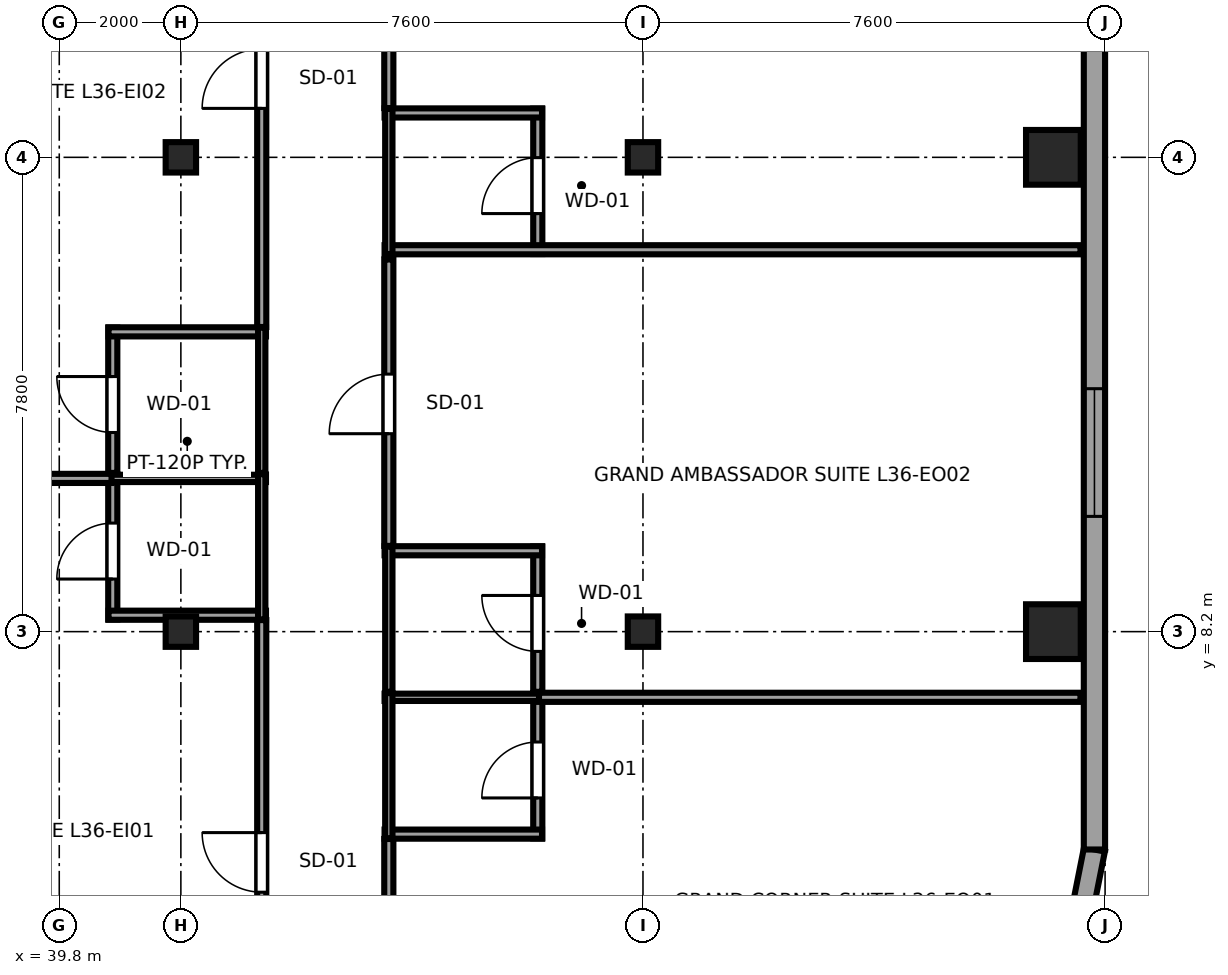
"""IFC4 building model, lengths in metres.
Left out: names, types, materials, properties, quantities, classifications, styles, units other than length and angle.
Written with IfcOpenShell. Run it as: python <this file> out.ifc"""

import sys

from ifc_helpers import new_model, si_unit, direction, frame, frame_2d, origin, origin_2d, place, context, subcontext, project, spatial, rectangle, i_section, extrude, source, transform, mapped, element, fill, save


model = new_model("IFC4")
c1 = context("Model", 3, precision=1e-05, world=origin(), true_north=direction((0.0, 1.0)))
c2 = subcontext(c1, "Body", "Model", "MODEL_VIEW")
j1 = project(units=[si_unit("LENGTHUNIT", "METRE"), si_unit("PLANEANGLEUNIT", "RADIAN")], contexts=[c1])
p1 = place(None, origin())
s1 = spatial("IfcSite", under=j1, at=p1, CompositionType="ELEMENT")
p2 = place(p1, origin())
s2 = spatial("IfcBuilding", under=s1, at=p2, CompositionType="ELEMENT")
p3 = place(p2, frame((0.0, 0.0, 139.95)))
s3 = spatial("IfcBuildingStorey", under=s2, at=p3, CompositionType="ELEMENT", Elevation=139.95)
m1 = source(origin(), c2, "Body", "SweptSolid", [
    extrude(i_section(OverallWidth=0.5, OverallDepth=0.5, WebThickness=0.022, FlangeThickness=0.034, at=origin_2d()), origin(), (0.0, 0.0, 1.0), 3.55),
])
for number, where, z_axis, x_axis in (
    (1, (41.8, 8.2, 0.0), (0.0, 0.0, 1.0), (1.0, 0.0, 0.0)),
    (2, (41.8, 16.0, 0.0), (0.0, 0.0, 1.0), (1.0, 0.0, 0.0)),
    (3, (49.4, 8.2, 0.0), (0.0, 0.0, 1.0), (1.0, 0.0, 0.0)),
    (4, (49.4, 16.0, 0.0), (0.0, 0.0, 1.0), (1.0, 0.0, 0.0)),
):
    element("IfcColumn", number, at=place(p3, frame(where, z_axis=z_axis, x_axis=x_axis)), inside=s3, PredefinedType="COLUMN", context=c2, shape_type="MappedRepresentation", body=[
        mapped(m1, transform((0.0, 0.0, 0.0), x_axis=(1.0, 0.0, 0.0), y_axis=(0.0, 1.0, 0.0), z_axis=(0.0, 0.0, 1.0), scale=1.0)),
    ])
m2 = source(origin(), c2, "Body", "SweptSolid", [
    extrude(rectangle(XDim=0.9, YDim=0.9, at=origin_2d()), origin(), (0.0, 0.0, 1.0), 3.55),
])
for number, where, z_axis, x_axis in (
    (5, (56.15, 8.2, 0.0), (0.0, 0.0, 1.0), (1.0, 0.0, 0.0)),
    (6, (56.15, 16.0, 0.0), (0.0, 0.0, 1.0), (1.0, 0.0, 0.0)),
):
    element("IfcColumn", number, at=place(p3, frame(where, z_axis=z_axis, x_axis=x_axis)), inside=s3, PredefinedType="COLUMN", context=c2, shape_type="MappedRepresentation", body=[
        mapped(m2, transform((0.0, 0.0, 0.0), x_axis=(1.0, 0.0, 0.0), y_axis=(0.0, 1.0, 0.0), z_axis=(0.0, 0.0, 1.0), scale=1.0)),
    ])
p4 = place(p3, frame((56.485, 2.908, 0.0), z_axis=(0.0, 0.0, 1.0), x_axis=(0.195011420161, 0.980800971659, 0.0)))
e7 = element("IfcWall", 7, at=p4, inside=s3, PredefinedType="SOLIDWALL", context=c2, shape_type="SweptSolid", body=[
    extrude(rectangle(XDim=1.743, YDim=0.35, at=frame_2d((0.871, 0.0))), origin(), (0.0, 0.0, 1.0), 3.37),
])
p5 = place(p3, frame((56.825, 4.617, 0.0), z_axis=(0.0, 0.0, 1.0), x_axis=(0.0, 1.0, 0.0)))
e8 = element("IfcWall", 8, at=p5, inside=s3, PredefinedType="SOLIDWALL", context=c2, shape_type="SweptSolid", body=[
    extrude(rectangle(XDim=36.766, YDim=0.35, at=frame_2d((18.383, 0.0))), origin(), (0.0, 0.0, 1.0), 3.37),
])
p6 = place(p5, frame((5.478, 0.0, 0.68)))
e9 = element("IfcOpeningElement", 9, at=p6, cuts=e8, PredefinedType="OPENING", context=c2, shape_type="SweptSolid", body=[
    extrude(rectangle(XDim=2.1, YDim=1.9, at=frame_2d((1.05, 0.95))), frame((0.0, 0.185, 0.0), z_axis=(0.0, -1.0, 0.0), x_axis=(1.0, 0.0, 0.0)), (0.0, 0.0, 1.0), 0.37),
])
p7 = place(p5, frame((13.381, 0.0, 0.68)))
e10 = element("IfcOpeningElement", 10, at=p7, cuts=e8, PredefinedType="OPENING", context=c2, shape_type="SweptSolid", body=[
    extrude(rectangle(XDim=2.1, YDim=1.9, at=frame_2d((1.05, 0.95))), frame((0.0, 0.185, 0.0), z_axis=(0.0, -1.0, 0.0), x_axis=(1.0, 0.0, 0.0)), (0.0, 0.0, 1.0), 0.37),
])
p8 = place(p5, frame((21.285, 0.0, 0.68)))
e11 = element("IfcOpeningElement", 11, at=p8, cuts=e8, PredefinedType="OPENING", context=c2, shape_type="SweptSolid", body=[
    extrude(rectangle(XDim=2.1, YDim=1.9, at=frame_2d((1.05, 0.95))), frame((0.0, 0.185, 0.0), z_axis=(0.0, -1.0, 0.0), x_axis=(1.0, 0.0, 0.0)), (0.0, 0.0, 1.0), 0.37),
])
p9 = place(p5, frame((30.238, 0.0, 0.68)))
e12 = element("IfcOpeningElement", 12, at=p9, cuts=e8, PredefinedType="OPENING", context=c2, shape_type="SweptSolid", body=[
    extrude(rectangle(XDim=2.1, YDim=1.9, at=frame_2d((1.05, 0.95))), frame((0.0, 0.185, 0.0), z_axis=(0.0, -1.0, 0.0), x_axis=(1.0, 0.0, 0.0)), (0.0, 0.0, 1.0), 0.37),
])
p10 = place(p3, frame((40.68, 8.4, 0.0), z_axis=(0.0, 0.0, 1.0), x_axis=(0.0, 1.0, 0.0)))
e13 = element("IfcWall", 13, at=p10, inside=s3, PredefinedType="PARTITIONING", context=c2, shape_type="SweptSolid", body=[
    extrude(rectangle(XDim=2.39, YDim=0.15, at=frame_2d((1.195, 0.0))), origin(), (0.0, 0.0, 1.0), 3.37),
])
p11 = place(p10, frame((0.665, 0.0, 0.0)))
e14 = element("IfcOpeningElement", 14, at=p11, cuts=e13, PredefinedType="OPENING", context=c2, shape_type="SweptSolid", body=[
    extrude(rectangle(XDim=0.92, YDim=2.01, at=frame_2d((0.46, 1.005))), frame((0.0, 0.085, 0.0), z_axis=(0.0, -1.0, 0.0), x_axis=(1.0, 0.0, 0.0)), (0.0, 0.0, 1.0), 0.17),
])
p12 = place(p3, frame((40.61, 8.47, 0.0), z_axis=(0.0, 0.0, 1.0), x_axis=(1.0, 0.0, 0.0)))
e15 = element("IfcWall", 15, at=p12, inside=s3, PredefinedType="PARTITIONING", context=c2, shape_type="SweptSolid", body=[
    extrude(rectangle(XDim=2.59, YDim=0.15, at=frame_2d((1.295, 0.0))), origin(), (0.0, 0.0, 1.0), 3.37),
])
p13 = place(p3, frame((40.61, 10.72, 0.0), z_axis=(0.0, 0.0, 1.0), x_axis=(1.0, 0.0, 0.0)))
e16 = element("IfcWall", 16, at=p13, inside=s3, PredefinedType="PLUMBINGWALL", context=c2, shape_type="SweptSolid", body=[
    extrude(rectangle(XDim=2.59, YDim=0.12, at=frame_2d((1.295, 0.0))), origin(), (0.0, 0.0, 1.0), 3.37),
])
p14 = place(p3, frame((43.13, 8.4, 0.0), z_axis=(0.0, 0.0, 1.0), x_axis=(0.0, 1.0, 0.0)))
e17 = element("IfcWall", 17, at=p14, inside=s3, PredefinedType="PLUMBINGWALL", context=c2, shape_type="SweptSolid", body=[
    extrude(rectangle(XDim=2.39, YDim=0.12, at=frame_2d((1.195, 0.0))), origin(), (0.0, 0.0, 1.0), 3.37),
])
p15 = place(p3, frame((40.68, 10.81, 0.0), z_axis=(0.0, 0.0, 1.0), x_axis=(0.0, 1.0, 0.0)))
e18 = element("IfcWall", 18, at=p15, inside=s3, PredefinedType="PARTITIONING", context=c2, shape_type="SweptSolid", body=[
    extrude(rectangle(XDim=2.39, YDim=0.15, at=frame_2d((1.195, 0.0))), origin(), (0.0, 0.0, 1.0), 3.37),
])
p16 = place(p15, frame((0.665, 0.0, 0.0)))
e19 = element("IfcOpeningElement", 19, at=p16, cuts=e18, PredefinedType="OPENING", context=c2, shape_type="SweptSolid", body=[
    extrude(rectangle(XDim=0.92, YDim=2.01, at=frame_2d((0.46, 1.005))), frame((0.0, 0.085, 0.0), z_axis=(0.0, -1.0, 0.0), x_axis=(1.0, 0.0, 0.0)), (0.0, 0.0, 1.0), 0.17),
])
p17 = place(p3, frame((40.61, 13.13, 0.0), z_axis=(0.0, 0.0, 1.0), x_axis=(1.0, 0.0, 0.0)))
e20 = element("IfcWall", 20, at=p17, inside=s3, PredefinedType="PARTITIONING", context=c2, shape_type="SweptSolid", body=[
    extrude(rectangle(XDim=2.59, YDim=0.15, at=frame_2d((1.295, 0.0))), origin(), (0.0, 0.0, 1.0), 3.37),
])
p18 = place(p3, frame((43.13, 10.81, 0.0), z_axis=(0.0, 0.0, 1.0), x_axis=(0.0, 1.0, 0.0)))
e21 = element("IfcWall", 21, at=p18, inside=s3, PredefinedType="PLUMBINGWALL", context=c2, shape_type="SweptSolid", body=[
    extrude(rectangle(XDim=2.39, YDim=0.12, at=frame_2d((1.195, 0.0))), origin(), (0.0, 0.0, 1.0), 3.37),
])
p19 = place(p3, frame((47.67, 4.8, 0.0), z_axis=(0.0, 0.0, 1.0), x_axis=(0.0, 1.0, 0.0)))
e22 = element("IfcWall", 22, at=p19, inside=s3, PredefinedType="PARTITIONING", context=c2, shape_type="SweptSolid", body=[
    extrude(rectangle(XDim=2.39, YDim=0.15, at=frame_2d((1.195, 0.0))), origin(), (0.0, 0.0, 1.0), 3.37),
])
p20 = place(p19, frame((0.665, 0.0, 0.0)))
e23 = element("IfcOpeningElement", 23, at=p20, cuts=e22, PredefinedType="OPENING", context=c2, shape_type="SweptSolid", body=[
    extrude(rectangle(XDim=0.92, YDim=2.01, at=frame_2d((0.46, 1.005))), frame((0.0, 0.085, 0.0), z_axis=(0.0, -1.0, 0.0), x_axis=(1.0, 0.0, 0.0)), (0.0, 0.0, 1.0), 0.17),
])
p21 = place(p3, frame((45.15, 4.87, 0.0), z_axis=(0.0, 0.0, 1.0), x_axis=(1.0, 0.0, 0.0)))
e24 = element("IfcWall", 24, at=p21, inside=s3, PredefinedType="PARTITIONING", context=c2, shape_type="SweptSolid", body=[
    extrude(rectangle(XDim=2.59, YDim=0.15, at=frame_2d((1.295, 0.0))), origin(), (0.0, 0.0, 1.0), 3.37),
])
p22 = place(p3, frame((45.15, 7.12, 0.0), z_axis=(0.0, 0.0, 1.0), x_axis=(1.0, 0.0, 0.0)))
e25 = element("IfcWall", 25, at=p22, inside=s3, PredefinedType="PLUMBINGWALL", context=c2, shape_type="SweptSolid", body=[
    extrude(rectangle(XDim=2.59, YDim=0.12, at=frame_2d((1.295, 0.0))), origin(), (0.0, 0.0, 1.0), 3.37),
])
p23 = place(p3, frame((45.22, 4.8, 0.0), z_axis=(0.0, 0.0, 1.0), x_axis=(0.0, 1.0, 0.0)))
e26 = element("IfcWall", 26, at=p23, inside=s3, PredefinedType="PLUMBINGWALL", context=c2, shape_type="SweptSolid", body=[
    extrude(rectangle(XDim=2.39, YDim=0.12, at=frame_2d((1.195, 0.0))), origin(), (0.0, 0.0, 1.0), 3.37),
])
p24 = place(p3, frame((47.67, 7.21, 0.0), z_axis=(0.0, 0.0, 1.0), x_axis=(0.0, 1.0, 0.0)))
e27 = element("IfcWall", 27, at=p24, inside=s3, PredefinedType="PARTITIONING", context=c2, shape_type="SweptSolid", body=[
    extrude(rectangle(XDim=2.39, YDim=0.15, at=frame_2d((1.195, 0.0))), origin(), (0.0, 0.0, 1.0), 3.37),
])
p25 = place(p24, frame((0.665, 0.0, 0.0)))
e28 = element("IfcOpeningElement", 28, at=p25, cuts=e27, PredefinedType="OPENING", context=c2, shape_type="SweptSolid", body=[
    extrude(rectangle(XDim=0.92, YDim=2.01, at=frame_2d((0.46, 1.005))), frame((0.0, 0.085, 0.0), z_axis=(0.0, -1.0, 0.0), x_axis=(1.0, 0.0, 0.0)), (0.0, 0.0, 1.0), 0.17),
])
p26 = place(p3, frame((45.15, 9.53, 0.0), z_axis=(0.0, 0.0, 1.0), x_axis=(1.0, 0.0, 0.0)))
e29 = element("IfcWall", 29, at=p26, inside=s3, PredefinedType="PARTITIONING", context=c2, shape_type="SweptSolid", body=[
    extrude(rectangle(XDim=2.59, YDim=0.15, at=frame_2d((1.295, 0.0))), origin(), (0.0, 0.0, 1.0), 3.37),
])
p27 = place(p3, frame((45.22, 7.21, 0.0), z_axis=(0.0, 0.0, 1.0), x_axis=(0.0, 1.0, 0.0)))
e30 = element("IfcWall", 30, at=p27, inside=s3, PredefinedType="PLUMBINGWALL", context=c2, shape_type="SweptSolid", body=[
    extrude(rectangle(XDim=2.39, YDim=0.12, at=frame_2d((1.195, 0.0))), origin(), (0.0, 0.0, 1.0), 3.37),
])
p28 = place(p3, frame((47.67, 14.41, 0.0), z_axis=(0.0, 0.0, 1.0), x_axis=(0.0, 1.0, 0.0)))
e31 = element("IfcWall", 31, at=p28, inside=s3, PredefinedType="PARTITIONING", context=c2, shape_type="SweptSolid", body=[
    extrude(rectangle(XDim=2.39, YDim=0.15, at=frame_2d((1.195, 0.0))), origin(), (0.0, 0.0, 1.0), 3.37),
])
p29 = place(p28, frame((0.665, 0.0, 0.0)))
e32 = element("IfcOpeningElement", 32, at=p29, cuts=e31, PredefinedType="OPENING", context=c2, shape_type="SweptSolid", body=[
    extrude(rectangle(XDim=0.92, YDim=2.01, at=frame_2d((0.46, 1.005))), frame((0.0, 0.085, 0.0), z_axis=(0.0, -1.0, 0.0), x_axis=(1.0, 0.0, 0.0)), (0.0, 0.0, 1.0), 0.17),
])
p30 = place(p3, frame((45.15, 14.48, 0.0), z_axis=(0.0, 0.0, 1.0), x_axis=(1.0, 0.0, 0.0)))
e33 = element("IfcWall", 33, at=p30, inside=s3, PredefinedType="PARTITIONING", context=c2, shape_type="SweptSolid", body=[
    extrude(rectangle(XDim=11.445, YDim=0.15, at=frame_2d((5.723, 0.0))), origin(), (0.0, 0.0, 1.0), 3.37),
])
p31 = place(p3, frame((45.15, 16.73, 0.0), z_axis=(0.0, 0.0, 1.0), x_axis=(1.0, 0.0, 0.0)))
e34 = element("IfcWall", 34, at=p31, inside=s3, PredefinedType="PARTITIONING", context=c2, shape_type="SweptSolid", body=[
    extrude(rectangle(XDim=2.59, YDim=0.15, at=frame_2d((1.295, 0.0))), origin(), (0.0, 0.0, 1.0), 3.37),
])
p32 = place(p3, frame((45.22, 14.41, 0.0), z_axis=(0.0, 0.0, 1.0), x_axis=(0.0, 1.0, 0.0)))
e35 = element("IfcWall", 35, at=p32, inside=s3, PredefinedType="PLUMBINGWALL", context=c2, shape_type="SweptSolid", body=[
    extrude(rectangle(XDim=2.39, YDim=0.12, at=frame_2d((1.195, 0.0))), origin(), (0.0, 0.0, 1.0), 3.37),
])
p33 = place(p3, frame((43.13, 0.405, 0.0), z_axis=(0.0, 0.0, 1.0), x_axis=(0.0, 1.0, 0.0)))
e36 = element("IfcWall", 36, at=p33, inside=s3, PredefinedType="PARTITIONING", context=c2, shape_type="SweptSolid", body=[
    extrude(rectangle(XDim=7.985, YDim=0.15, at=frame_2d((3.992, 0.0))), origin(), (0.0, 0.0, 1.0), 3.37),
])
p34 = place(p33, frame((3.51, 0.0, 0.0)))
e37 = element("IfcOpeningElement", 37, at=p34, cuts=e36, PredefinedType="OPENING", context=c2, shape_type="SweptSolid", body=[
    extrude(rectangle(XDim=0.98, YDim=2.12, at=frame_2d((0.49, 1.06))), frame((0.0, 0.085, 0.0), z_axis=(0.0, -1.0, 0.0), x_axis=(1.0, 0.0, 0.0)), (0.0, 0.0, 1.0), 0.17),
])
p35 = place(p3, frame((34.65, 10.72, 0.0), z_axis=(0.0, 0.0, 1.0), x_axis=(1.0, 0.0, 0.0)))
e38 = element("IfcWall", 38, at=p35, inside=s3, PredefinedType="PARTITIONING", context=c2, shape_type="SweptSolid", body=[
    extrude(rectangle(XDim=6.01, YDim=0.15, at=frame_2d((3.005, 0.0))), origin(), (0.0, 0.0, 1.0), 3.37),
])
p36 = place(p3, frame((43.13, 13.21, 0.0), z_axis=(0.0, 0.0, 1.0), x_axis=(0.0, 1.0, 0.0)))
e39 = element("IfcWall", 39, at=p36, inside=s3, PredefinedType="PARTITIONING", context=c2, shape_type="SweptSolid", body=[
    extrude(rectangle(XDim=8.21, YDim=0.15, at=frame_2d((4.105, 0.0))), origin(), (0.0, 0.0, 1.0), 3.37),
])
p37 = place(p36, frame((3.595, 0.0, 0.0)))
e40 = element("IfcOpeningElement", 40, at=p37, cuts=e39, PredefinedType="OPENING", context=c2, shape_type="SweptSolid", body=[
    extrude(rectangle(XDim=0.98, YDim=2.12, at=frame_2d((0.49, 1.06))), frame((0.0, 0.085, 0.0), z_axis=(0.0, -1.0, 0.0), x_axis=(1.0, 0.0, 0.0)), (0.0, 0.0, 1.0), 0.17),
])
p38 = place(p3, frame((45.22, 0.405, 0.0), z_axis=(0.0, 0.0, 1.0), x_axis=(0.0, 1.0, 0.0)))
e41 = element("IfcWall", 41, at=p38, inside=s3, PredefinedType="PARTITIONING", context=c2, shape_type="SweptSolid", body=[
    extrude(rectangle(XDim=4.385, YDim=0.15, at=frame_2d((2.192, 0.0))), origin(), (0.0, 0.0, 1.0), 3.37),
])
p39 = place(p38, frame((1.71, 0.0, 0.0)))
e42 = element("IfcOpeningElement", 42, at=p39, cuts=e41, PredefinedType="OPENING", context=c2, shape_type="SweptSolid", body=[
    extrude(rectangle(XDim=0.98, YDim=2.12, at=frame_2d((0.49, 1.06))), frame((0.0, 0.085, 0.0), z_axis=(0.0, -1.0, 0.0), x_axis=(1.0, 0.0, 0.0)), (0.0, 0.0, 1.0), 0.17),
])
p40 = place(p3, frame((47.69, 7.12, 0.0), z_axis=(0.0, 0.0, 1.0), x_axis=(1.0, 0.0, 0.0)))
e43 = element("IfcWall", 43, at=p40, inside=s3, PredefinedType="PARTITIONING", context=c2, shape_type="SweptSolid", body=[
    extrude(rectangle(XDim=8.905, YDim=0.15, at=frame_2d((4.453, 0.0))), origin(), (0.0, 0.0, 1.0), 3.37),
])
p41 = place(p3, frame((45.22, 9.61, 0.0), z_axis=(0.0, 0.0, 1.0), x_axis=(0.0, 1.0, 0.0)))
e44 = element("IfcWall", 44, at=p41, inside=s3, PredefinedType="PARTITIONING", context=c2, shape_type="SweptSolid", body=[
    extrude(rectangle(XDim=4.71, YDim=0.15, at=frame_2d((2.355, 0.0))), origin(), (0.0, 0.0, 1.0), 3.37),
])
p42 = place(p41, frame((1.845, 0.0, 0.0)))
e45 = element("IfcOpeningElement", 45, at=p42, cuts=e44, PredefinedType="OPENING", context=c2, shape_type="SweptSolid", body=[
    extrude(rectangle(XDim=0.98, YDim=2.12, at=frame_2d((0.49, 1.06))), frame((0.0, 0.085, 0.0), z_axis=(0.0, -1.0, 0.0), x_axis=(1.0, 0.0, 0.0)), (0.0, 0.0, 1.0), 0.17),
])
p43 = place(p3, frame((45.22, 16.81, 0.0), z_axis=(0.0, 0.0, 1.0), x_axis=(0.0, 1.0, 0.0)))
e46 = element("IfcWall", 46, at=p43, inside=s3, PredefinedType="PARTITIONING", context=c2, shape_type="SweptSolid", body=[
    extrude(rectangle(XDim=4.61, YDim=0.15, at=frame_2d((2.305, 0.0))), origin(), (0.0, 0.0, 1.0), 3.37),
])
p44 = place(p43, frame((1.795, 0.0, 0.0)))
e47 = element("IfcOpeningElement", 47, at=p44, cuts=e46, PredefinedType="OPENING", context=c2, shape_type="SweptSolid", body=[
    extrude(rectangle(XDim=0.98, YDim=2.12, at=frame_2d((0.49, 1.06))), frame((0.0, 0.085, 0.0), z_axis=(0.0, -1.0, 0.0), x_axis=(1.0, 0.0, 0.0)), (0.0, 0.0, 1.0), 0.17),
])
m3 = source(origin(), c2, "Body", "SweptSolid", [
    extrude(rectangle(XDim=2.1, YDim=1.9, at=frame_2d((1.05, 0.95))), frame((0.0, 0.09, 0.0), z_axis=(0.0, -1.0, 0.0), x_axis=(1.0, 0.0, 0.0)), (0.0, 0.0, 1.0), 0.06),
])
p45 = place(p6, origin())
e48 = element("IfcWindow", 48, at=p45, inside=s3, PartitioningType="TRIPLE_PANEL_HORIZONTAL", PredefinedType="WINDOW", context=c2, shape_type="MappedRepresentation", body=[
    mapped(m3, transform((0.0, 0.0, 0.0), x_axis=(1.0, 0.0, 0.0), y_axis=(0.0, 1.0, 0.0), z_axis=(0.0, 0.0, 1.0), scale=1.0)),
])
fill(e9, e48)
m4 = source(origin(), c2, "Body", "SweptSolid", [
    extrude(rectangle(XDim=0.92, YDim=2.01, at=frame_2d((0.46, 1.005))), frame((0.0, 0.025, 0.0), z_axis=(0.0, -1.0, 0.0), x_axis=(1.0, 0.0, 0.0)), (0.0, 0.0, 1.0), 0.05),
])
p46 = place(p11, origin())
e49 = element("IfcDoor", 49, at=p46, inside=s3, OperationType="SINGLE_SWING_LEFT", PredefinedType="DOOR", context=c2, shape_type="MappedRepresentation", body=[
    mapped(m4, transform((0.0, 0.0, 0.0), x_axis=(1.0, 0.0, 0.0), y_axis=(0.0, 1.0, 0.0), z_axis=(0.0, 0.0, 1.0), scale=1.0)),
])
fill(e14, e49)
p47 = place(p16, origin())
e50 = element("IfcDoor", 50, at=p47, inside=s3, OperationType="SINGLE_SWING_RIGHT", PredefinedType="DOOR", context=c2, shape_type="MappedRepresentation", body=[
    mapped(m4, transform((0.0, 0.0, 0.0), x_axis=(1.0, 0.0, 0.0), y_axis=(0.0, 1.0, 0.0), z_axis=(0.0, 0.0, 1.0), scale=1.0)),
])
fill(e19, e50)
p48 = place(p20, origin())
e51 = element("IfcDoor", 51, at=p48, inside=s3, OperationType="SINGLE_SWING_LEFT", PredefinedType="DOOR", context=c2, shape_type="MappedRepresentation", body=[
    mapped(m4, transform((0.0, 0.0, 0.0), x_axis=(1.0, 0.0, 0.0), y_axis=(0.0, 1.0, 0.0), z_axis=(0.0, 0.0, 1.0), scale=1.0)),
])
fill(e23, e51)
p49 = place(p25, origin())
e52 = element("IfcDoor", 52, at=p49, inside=s3, OperationType="SINGLE_SWING_RIGHT", PredefinedType="DOOR", context=c2, shape_type="MappedRepresentation", body=[
    mapped(m4, transform((0.0, 0.0, 0.0), x_axis=(1.0, 0.0, 0.0), y_axis=(0.0, 1.0, 0.0), z_axis=(0.0, 0.0, 1.0), scale=1.0)),
])
fill(e28, e52)
p50 = place(p29, origin())
e53 = element("IfcDoor", 53, at=p50, inside=s3, OperationType="SINGLE_SWING_LEFT", PredefinedType="DOOR", context=c2, shape_type="MappedRepresentation", body=[
    mapped(m4, transform((0.0, 0.0, 0.0), x_axis=(1.0, 0.0, 0.0), y_axis=(0.0, 1.0, 0.0), z_axis=(0.0, 0.0, 1.0), scale=1.0)),
])
fill(e32, e53)
m5 = source(origin(), c2, "Body", "SweptSolid", [
    extrude(rectangle(XDim=0.98, YDim=2.12, at=frame_2d((0.49, 1.06))), frame((0.0, 0.025, 0.0), z_axis=(0.0, -1.0, 0.0), x_axis=(1.0, 0.0, 0.0)), (0.0, 0.0, 1.0), 0.05),
])
p51 = place(p34, origin())
e54 = element("IfcDoor", 54, at=p51, inside=s3, OperationType="SINGLE_SWING_RIGHT", PredefinedType="DOOR", context=c2, shape_type="MappedRepresentation", body=[
    mapped(m5, transform((0.0, 0.0, 0.0), x_axis=(1.0, 0.0, 0.0), y_axis=(0.0, 1.0, 0.0), z_axis=(0.0, 0.0, 1.0), scale=1.0)),
])
fill(e37, e54)
p52 = place(p37, origin())
e55 = element("IfcDoor", 55, at=p52, inside=s3, OperationType="SINGLE_SWING_LEFT", PredefinedType="DOOR", context=c2, shape_type="MappedRepresentation", body=[
    mapped(m5, transform((0.0, 0.0, 0.0), x_axis=(1.0, 0.0, 0.0), y_axis=(0.0, 1.0, 0.0), z_axis=(0.0, 0.0, 1.0), scale=1.0)),
])
fill(e40, e55)
p53 = place(p42, origin())
e56 = element("IfcDoor", 56, at=p53, inside=s3, OperationType="SINGLE_SWING_LEFT", PredefinedType="DOOR", context=c2, shape_type="MappedRepresentation", body=[
    mapped(m5, transform((0.0, 0.0, 0.0), x_axis=(1.0, 0.0, 0.0), y_axis=(0.0, 1.0, 0.0), z_axis=(0.0, 0.0, 1.0), scale=1.0)),
])
fill(e45, e56)
save(model, sys.argv[1])
